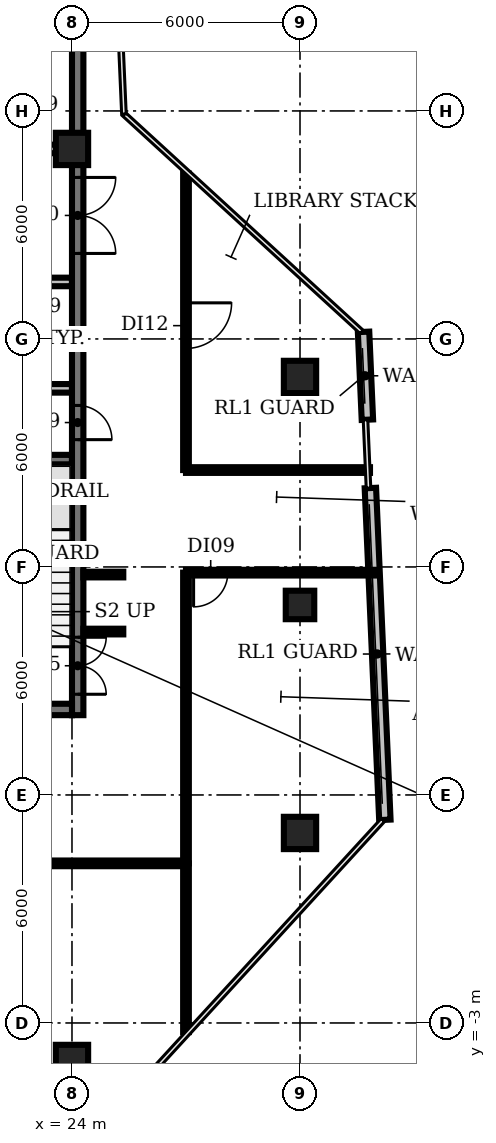
"""IFC4 building model, lengths in metres.
Left out: names, types, materials, properties, quantities, classifications, styles, units other than length and angle.
Written with IfcOpenShell. Run it as: python <this file> out.ifc"""

import sys

from ifc_helpers import new_model, si_unit, direction, frame, frame_2d, origin, origin_2d, place, context, subcontext, project, spatial, rectangle, circle, extrude, element, fill, save


model = new_model("IFC4")
c1 = context("Model", 3, precision=1e-05, world=origin(), true_north=direction((0.0, 1.0)))
c2 = subcontext(c1, "Body", "Model", "MODEL_VIEW")
j1 = project(units=[si_unit("LENGTHUNIT", "METRE"), si_unit("PLANEANGLEUNIT", "RADIAN")], contexts=[c1])
p1 = place(None, origin())
s1 = spatial("IfcSite", under=j1, at=p1, CompositionType="ELEMENT")
p2 = place(p1, origin())
s2 = spatial("IfcBuilding", under=s1, at=p2, CompositionType="ELEMENT")
p3 = place(p2, frame((0.0, 0.0, 297.8)))
s3 = spatial("IfcBuildingStorey", under=s2, at=p3, CompositionType="ELEMENT", Elevation=297.8)
for number, where, z_axis, x_axis in (
    (1, (24.0, -4.0, 0.0), (0.0, 0.0, 1.0), (1.0, 0.0, 0.0)),
    (2, (24.0, 20.0, 0.0), (0.0, 0.0, 1.0), (1.0, 0.0, 0.0)),
    (3, (30.0, 2.0, 0.0), (0.0, 0.0, 1.0), (1.0, 0.0, 0.0)),
):
    element("IfcColumn", number, at=place(p3, frame(where, z_axis=z_axis, x_axis=x_axis)), inside=s3, PredefinedType="COLUMN", context=c2, shape_type="SweptSolid", body=[
        extrude(circle(Radius=0.425, at=origin_2d()), origin(), (0.0, 0.0, 1.0), 3.85),
    ])
p4 = place(p3, frame((30.0, 8.0, 0.0), z_axis=(0.0, 0.0, 1.0), x_axis=(1.0, 0.0, 0.0)))
e4 = element("IfcColumn", 4, at=p4, inside=s3, PredefinedType="COLUMN", context=c2, shape_type="SweptSolid", body=[
    extrude(rectangle(XDim=0.75, YDim=0.75, at=origin_2d()), origin(), (0.0, 0.0, 1.0), 3.85),
])
p5 = place(p3, frame((30.0, 14.0, 0.0), z_axis=(0.0, 0.0, 1.0), x_axis=(1.0, 0.0, 0.0)))
e5 = element("IfcColumn", 5, at=p5, inside=s3, PredefinedType="COLUMN", context=c2, shape_type="SweptSolid", body=[
    extrude(circle(Radius=0.425, at=origin_2d()), origin(), (0.0, 0.0, 1.0), 3.85),
])
p6 = place(p3, frame((32.233, 2.345, 0.0), z_axis=(0.0, 0.0, 1.0), x_axis=(-0.043605726563, 0.999048817932, 0.0)))
e6 = element("IfcWall", 6, at=p6, inside=s3, PredefinedType="SOLIDWALL", context=c2, shape_type="SweptSolid", body=[
    extrude(rectangle(XDim=8.74, YDim=0.3, at=frame_2d((4.37, 0.0))), origin(), (0.0, 0.0, 1.0), 3.85),
])
p7 = place(p3, frame((31.773, 12.875, 0.0), z_axis=(0.0, 0.0, 1.0), x_axis=(-0.043588366225, 0.999049575512, 0.0)))
e7 = element("IfcWall", 7, at=p7, inside=s3, PredefinedType="SOLIDWALL", context=c2, shape_type="SweptSolid", body=[
    extrude(rectangle(XDim=2.313, YDim=0.3, at=frame_2d((1.157, 0.0))), origin(), (0.0, 0.0, 1.0), 3.85),
])
p8 = place(p3, frame((20.85, 11.825, 0.0), z_axis=(0.0, 0.0, 1.0), x_axis=(1.0, 0.0, 0.0)))
e8 = element("IfcWall", 8, at=p8, inside=s3, PredefinedType="SHEAR", context=c2, shape_type="SweptSolid", body=[
    extrude(rectangle(XDim=3.15, YDim=0.25, at=frame_2d((1.575, 0.0))), origin(), (0.0, 0.0, 1.0), 3.85),
])
p9 = place(p3, frame((16.6, 13.7, 0.0), z_axis=(0.0, 0.0, 1.0), x_axis=(1.0, 0.0, 0.0)))
e9 = element("IfcWall", 9, at=p9, inside=s3, PredefinedType="PARTITIONING", context=c2, shape_type="SweptSolid", body=[
    extrude(rectangle(XDim=7.4, YDim=0.225, at=frame_2d((3.7, 0.0))), origin(), (0.0, 0.0, 1.0), 3.85),
])
p10 = place(p3, frame((9.4, 16.5, 0.0), z_axis=(0.0, 0.0, 1.0), x_axis=(1.0, 0.0, 0.0)))
e10 = element("IfcWall", 10, at=p10, inside=s3, PredefinedType="PARTITIONING", context=c2, shape_type="SweptSolid", body=[
    extrude(rectangle(XDim=14.6, YDim=0.225, at=frame_2d((7.3, 0.0))), origin(), (0.0, 0.0, 1.0), 3.85),
])
p11 = place(p10, frame((1.9, 0.0, 0.0)))
e11 = element("IfcOpeningElement", 11, at=p11, cuts=e10, PredefinedType="OPENING", context=c2, shape_type="SweptSolid", body=[
    extrude(rectangle(XDim=1.0, YDim=2.1, at=frame_2d((0.5, 1.05))), frame((0.0, 0.123, 0.0), z_axis=(0.0, -1.0, 0.0), x_axis=(1.0, 0.0, 0.0)), (0.0, 0.0, 1.0), 0.245),
])
p12 = place(p10, frame((7.475, 0.0, 0.0)))
e12 = element("IfcOpeningElement", 12, at=p12, cuts=e10, PredefinedType="OPENING", context=c2, shape_type="SweptSolid", body=[
    extrude(rectangle(XDim=1.0, YDim=2.1, at=frame_2d((0.5, 1.05))), frame((0.0, 0.123, 0.0), z_axis=(0.0, -1.0, 0.0), x_axis=(1.0, 0.0, 0.0)), (0.0, 0.0, 1.0), 0.245),
])
p13 = place(p10, frame((11.308, 0.0, 0.0)))
e13 = element("IfcOpeningElement", 13, at=p13, cuts=e10, PredefinedType="OPENING", context=c2, shape_type="SweptSolid", body=[
    extrude(rectangle(XDim=0.9, YDim=2.1, at=frame_2d((0.45, 1.05))), frame((0.0, 0.123, 0.0), z_axis=(0.0, -1.0, 0.0), x_axis=(1.0, 0.0, 0.0)), (0.0, 0.0, 1.0), 0.245),
])
p14 = place(p10, frame((13.083, 0.0, 0.0)))
e14 = element("IfcOpeningElement", 14, at=p14, cuts=e10, PredefinedType="OPENING", context=c2, shape_type="SweptSolid", body=[
    extrude(rectangle(XDim=0.9, YDim=2.1, at=frame_2d((0.45, 1.05))), frame((0.0, 0.123, 0.0), z_axis=(0.0, -1.0, 0.0), x_axis=(1.0, 0.0, 0.0)), (0.0, 0.0, 1.0), 0.245),
])
p15 = place(p3, frame((24.0, 20.0, 0.0), z_axis=(0.0, 0.0, 1.0), x_axis=(-1.0, 0.0, 0.0)))
e15 = element("IfcWall", 15, at=p15, inside=s3, PredefinedType="PARTITIONING", context=c2, shape_type="SweptSolid", body=[
    extrude(rectangle(XDim=14.6, YDim=0.225, at=frame_2d((7.3, 0.0))), origin(), (0.0, 0.0, 1.0), 3.85),
])
p16 = place(p15, frame((12.75, 0.0, 0.0)))
e16 = element("IfcOpeningElement", 16, at=p16, cuts=e15, PredefinedType="OPENING", context=c2, shape_type="SweptSolid", body=[
    extrude(rectangle(XDim=1.1, YDim=2.1, at=frame_2d((0.55, 1.05))), frame((0.0, 0.123, 0.0), z_axis=(0.0, -1.0, 0.0), x_axis=(1.0, 0.0, 0.0)), (0.0, 0.0, 1.0), 0.245),
])
p17 = place(p15, frame((9.95, 0.0, 0.0)))
e17 = element("IfcOpeningElement", 17, at=p17, cuts=e15, PredefinedType="OPENING", context=c2, shape_type="SweptSolid", body=[
    extrude(rectangle(XDim=1.1, YDim=2.1, at=frame_2d((0.55, 1.05))), frame((0.0, 0.123, 0.0), z_axis=(0.0, -1.0, 0.0), x_axis=(1.0, 0.0, 0.0)), (0.0, 0.0, 1.0), 0.245),
])
p18 = place(p15, frame((7.15, 0.0, 0.0)))
e18 = element("IfcOpeningElement", 18, at=p18, cuts=e15, PredefinedType="OPENING", context=c2, shape_type="SweptSolid", body=[
    extrude(rectangle(XDim=1.1, YDim=2.1, at=frame_2d((0.55, 1.05))), frame((0.0, 0.123, 0.0), z_axis=(0.0, -1.0, 0.0), x_axis=(1.0, 0.0, 0.0)), (0.0, 0.0, 1.0), 0.245),
])
p19 = place(p15, frame((4.35, 0.0, 0.0)))
e19 = element("IfcOpeningElement", 19, at=p19, cuts=e15, PredefinedType="OPENING", context=c2, shape_type="SweptSolid", body=[
    extrude(rectangle(XDim=1.1, YDim=2.1, at=frame_2d((0.55, 1.05))), frame((0.0, 0.123, 0.0), z_axis=(0.0, -1.0, 0.0), x_axis=(1.0, 0.0, 0.0)), (0.0, 0.0, 1.0), 0.245),
])
p20 = place(p15, frame((2.308, 0.0, 0.0)))
e20 = element("IfcOpeningElement", 20, at=p20, cuts=e15, PredefinedType="OPENING", context=c2, shape_type="SweptSolid", body=[
    extrude(rectangle(XDim=0.9, YDim=2.1, at=frame_2d((0.45, 1.05))), frame((0.0, 0.123, 0.0), z_axis=(0.0, -1.0, 0.0), x_axis=(1.0, 0.0, 0.0)), (0.0, 0.0, 1.0), 0.245),
])
p21 = place(p15, frame((0.633, 0.0, 0.0)))
e21 = element("IfcOpeningElement", 21, at=p21, cuts=e15, PredefinedType="OPENING", context=c2, shape_type="SweptSolid", body=[
    extrude(rectangle(XDim=0.9, YDim=2.1, at=frame_2d((0.45, 1.05))), frame((0.0, 0.123, 0.0), z_axis=(0.0, -1.0, 0.0), x_axis=(1.0, 0.0, 0.0)), (0.0, 0.0, 1.0), 0.245),
])
p22 = place(p3, frame((24.15, 25.655, 0.0), z_axis=(0.0, 0.0, 1.0), x_axis=(0.0, -1.0, 0.0)))
e22 = element("IfcWall", 22, at=p22, inside=s3, PredefinedType="SHEAR", context=c2, shape_type="SweptSolid", body=[
    extrude(rectangle(XDim=20.555, YDim=0.3, at=frame_2d((10.277, 0.0))), origin(), (0.0, 0.0, 1.0), 3.85),
])
p23 = place(p22, frame((18.505, 0.0, 0.0)))
e23 = element("IfcOpeningElement", 23, at=p23, cuts=e22, PredefinedType="OPENING", context=c2, shape_type="SweptSolid", body=[
    extrude(rectangle(XDim=1.5, YDim=2.1, at=frame_2d((0.75, 1.05))), frame((0.0, 0.16, 0.0), z_axis=(0.0, -1.0, 0.0), x_axis=(1.0, 0.0, 0.0)), (0.0, 0.0, 1.0), 0.32),
])
p24 = place(p22, frame((12.405, 0.0, 0.0)))
e24 = element("IfcOpeningElement", 24, at=p24, cuts=e22, PredefinedType="OPENING", context=c2, shape_type="SweptSolid", body=[
    extrude(rectangle(XDim=0.9, YDim=2.1, at=frame_2d((0.45, 1.05))), frame((0.0, 0.16, 0.0), z_axis=(0.0, -1.0, 0.0), x_axis=(1.0, 0.0, 0.0)), (0.0, 0.0, 1.0), 0.32),
])
p25 = place(p22, frame((6.405, 0.0, 0.0)))
e25 = element("IfcOpeningElement", 25, at=p25, cuts=e22, PredefinedType="OPENING", context=c2, shape_type="SweptSolid", body=[
    extrude(rectangle(XDim=2.0, YDim=2.1, at=frame_2d((1.0, 1.05))), frame((0.0, 0.16, 0.0), z_axis=(0.0, -1.0, 0.0), x_axis=(1.0, 0.0, 0.0)), (0.0, 0.0, 1.0), 0.32),
])
p26 = place(p3, frame((24.0, 5.25, 0.0), z_axis=(0.0, 0.0, 1.0), x_axis=(-1.0, 0.0, 0.0)))
e26 = element("IfcWall", 26, at=p26, inside=s3, PredefinedType="SHEAR", context=c2, shape_type="SweptSolid", body=[
    extrude(rectangle(XDim=18.0, YDim=0.3, at=frame_2d((9.0, 0.0))), origin(), (0.0, 0.0, 1.0), 3.85),
])
p27 = place(p26, frame((13.0, 0.0, 0.0)))
e27 = element("IfcOpeningElement", 27, at=p27, cuts=e26, PredefinedType="OPENING", context=c2, shape_type="SweptSolid", body=[
    extrude(rectangle(XDim=1.2, YDim=2.1, at=frame_2d((0.6, 1.05))), frame((0.0, 0.16, 0.0), z_axis=(0.0, -1.0, 0.0), x_axis=(1.0, 0.0, 0.0)), (0.0, 0.0, 1.0), 0.32),
])
p28 = place(p26, frame((4.9, 0.0, 0.0)))
e28 = element("IfcOpeningElement", 28, at=p28, cuts=e26, PredefinedType="OPENING", context=c2, shape_type="SweptSolid", body=[
    extrude(rectangle(XDim=1.0, YDim=2.1, at=frame_2d((0.5, 1.05))), frame((0.0, 0.16, 0.0), z_axis=(0.0, -1.0, 0.0), x_axis=(1.0, 0.0, 0.0)), (0.0, 0.0, 1.0), 0.32),
])
for number, where, z_axis, x_axis in (
    (29, (24.3, 7.3, 0.0), (0.0, 0.0, 1.0), (1.0, 0.0, 0.0)),
    (30, (24.3, 8.8, 0.0), (0.0, 0.0, 1.0), (1.0, 0.0, 0.0)),
):
    element("IfcWall", number, at=place(p3, frame(where, z_axis=z_axis, x_axis=x_axis)), inside=s3, PredefinedType="PARTITIONING", context=c2, shape_type="SweptSolid", body=[
        extrude(rectangle(XDim=1.05, YDim=0.15, at=frame_2d((0.525, 0.0))), origin(), (0.0, 0.0, 1.0), 2.9),
    ])
p29 = place(p3, frame((27.0, -3.24, 0.0), z_axis=(0.0, 0.0, 1.0), x_axis=(0.0, 1.0, 0.0)))
e31 = element("IfcWall", 31, at=p29, inside=s3, PredefinedType="PARTITIONING", context=c2, shape_type="SweptSolid", body=[
    extrude(rectangle(XDim=4.44, YDim=0.15, at=frame_2d((2.22, 0.0))), origin(), (0.0, 0.0, 1.0), 2.9),
])
p30 = place(p3, frame((27.0, 1.2, 0.0), z_axis=(0.0, 0.0, 1.0), x_axis=(-1.0, 0.0, 0.0)))
e32 = element("IfcWall", 32, at=p30, inside=s3, PredefinedType="PARTITIONING", context=c2, shape_type="SweptSolid", body=[
    extrude(rectangle(XDim=24.0, YDim=0.15, at=frame_2d((12.0, 0.0))), origin(), (0.0, 0.0, 1.0), 2.9),
])
p31 = place(p30, frame((11.5, 0.0, 0.0)))
e33 = element("IfcOpeningElement", 33, at=p31, cuts=e32, PredefinedType="OPENING", context=c2, shape_type="SweptSolid", body=[
    extrude(rectangle(XDim=1.2, YDim=2.1, at=frame_2d((0.6, 1.05))), frame((0.0, 0.085, 0.0), z_axis=(0.0, -1.0, 0.0), x_axis=(1.0, 0.0, 0.0)), (0.0, 0.0, 1.0), 0.17),
])
p32 = place(p3, frame((27.0, 1.2, 0.0), z_axis=(0.0, 0.0, 1.0), x_axis=(0.0, 1.0, 0.0)))
e34 = element("IfcWall", 34, at=p32, inside=s3, PredefinedType="PARTITIONING", context=c2, shape_type="SweptSolid", body=[
    extrude(rectangle(XDim=7.65, YDim=0.15, at=frame_2d((3.825, 0.0))), origin(), (0.0, 0.0, 1.0), 2.9),
])
p33 = place(p3, frame((27.0, 11.55, 0.0), z_axis=(0.0, 0.0, 1.0), x_axis=(1.0, 0.0, 0.0)))
e35 = element("IfcWall", 35, at=p33, inside=s3, PredefinedType="PARTITIONING", context=c2, shape_type="SweptSolid", body=[
    extrude(rectangle(XDim=4.842, YDim=0.15, at=frame_2d((2.421, 0.0))), origin(), (0.0, 0.0, 1.0), 2.9),
])
p34 = place(p3, frame((27.0, 19.35, 0.0), z_axis=(0.0, 0.0, 1.0), x_axis=(0.0, -1.0, 0.0)))
e36 = element("IfcWall", 36, at=p34, inside=s3, PredefinedType="PARTITIONING", context=c2, shape_type="SweptSolid", body=[
    extrude(rectangle(XDim=7.8, YDim=0.15, at=frame_2d((3.9, 0.0))), origin(), (0.0, 0.0, 1.0), 2.9),
])
p35 = place(p34, frame((3.4, 0.0, 0.0)))
e37 = element("IfcOpeningElement", 37, at=p35, cuts=e36, PredefinedType="OPENING", context=c2, shape_type="SweptSolid", body=[
    extrude(rectangle(XDim=1.2, YDim=2.1, at=frame_2d((0.6, 1.05))), frame((0.0, 0.085, 0.0), z_axis=(0.0, -1.0, 0.0), x_axis=(1.0, 0.0, 0.0)), (0.0, 0.0, 1.0), 0.17),
])
p36 = place(p3, frame((31.959, 8.85, 0.0), z_axis=(0.0, 0.0, 1.0), x_axis=(-1.0, 0.0, 0.0)))
e38 = element("IfcWall", 38, at=p36, inside=s3, PredefinedType="PARTITIONING", context=c2, shape_type="SweptSolid", body=[
    extrude(rectangle(XDim=4.959, YDim=0.15, at=frame_2d((2.48, 0.0))), origin(), (0.0, 0.0, 1.0), 2.9),
])
p37 = place(p36, frame((3.859, 0.0, 0.0)))
e39 = element("IfcOpeningElement", 39, at=p37, cuts=e38, PredefinedType="OPENING", context=c2, shape_type="SweptSolid", body=[
    extrude(rectangle(XDim=0.9, YDim=2.1, at=frame_2d((0.45, 1.05))), frame((0.0, 0.085, 0.0), z_axis=(0.0, -1.0, 0.0), x_axis=(1.0, 0.0, 0.0)), (0.0, 0.0, 1.0), 0.17),
])
p38 = place(p23, origin())
e40 = element("IfcDoor", 40, at=p38, inside=s3, OperationType="DOUBLE_DOOR_SINGLE_SWING", PredefinedType="DOOR", context=c2, shape_type="SweptSolid", body=[
    extrude(rectangle(XDim=1.5, YDim=2.1, at=frame_2d((0.75, 1.05))), frame((0.0, 0.025, 0.0), z_axis=(0.0, -1.0, 0.0), x_axis=(1.0, 0.0, 0.0)), (0.0, 0.0, 1.0), 0.05),
])
fill(e23, e40)
p39 = place(p24, origin())
e41 = element("IfcDoor", 41, at=p39, inside=s3, OperationType="SINGLE_SWING_RIGHT", PredefinedType="DOOR", context=c2, shape_type="SweptSolid", body=[
    extrude(rectangle(XDim=0.9, YDim=2.1, at=frame_2d((0.45, 1.05))), frame((0.0, 0.025, 0.0), z_axis=(0.0, -1.0, 0.0), x_axis=(1.0, 0.0, 0.0)), (0.0, 0.0, 1.0), 0.05),
])
fill(e24, e41)
p40 = place(p25, origin())
e42 = element("IfcDoor", 42, at=p40, inside=s3, OperationType="DOUBLE_DOOR_SINGLE_SWING", PredefinedType="DOOR", context=c2, shape_type="SweptSolid", body=[
    extrude(rectangle(XDim=2.0, YDim=2.1, at=frame_2d((1.0, 1.05))), frame((0.0, 0.025, 0.0), z_axis=(0.0, -1.0, 0.0), x_axis=(1.0, 0.0, 0.0)), (0.0, 0.0, 1.0), 0.05),
])
fill(e25, e42)
p41 = place(p35, origin())
e43 = element("IfcDoor", 43, at=p41, inside=s3, OperationType="SINGLE_SWING_LEFT", PredefinedType="DOOR", context=c2, shape_type="SweptSolid", body=[
    extrude(rectangle(XDim=1.2, YDim=2.1, at=frame_2d((0.6, 1.05))), frame((0.0, 0.025, 0.0), z_axis=(0.0, -1.0, 0.0), x_axis=(1.0, 0.0, 0.0)), (0.0, 0.0, 1.0), 0.05),
])
fill(e37, e43)
p42 = place(p37, origin())
e44 = element("IfcDoor", 44, at=p42, inside=s3, OperationType="SINGLE_SWING_RIGHT", PredefinedType="DOOR", context=c2, shape_type="SweptSolid", body=[
    extrude(rectangle(XDim=0.9, YDim=2.1, at=frame_2d((0.45, 1.05))), frame((0.0, 0.025, 0.0), z_axis=(0.0, -1.0, 0.0), x_axis=(1.0, 0.0, 0.0)), (0.0, 0.0, 1.0), 0.05),
])
fill(e39, e44)
save(model, sys.argv[1])
